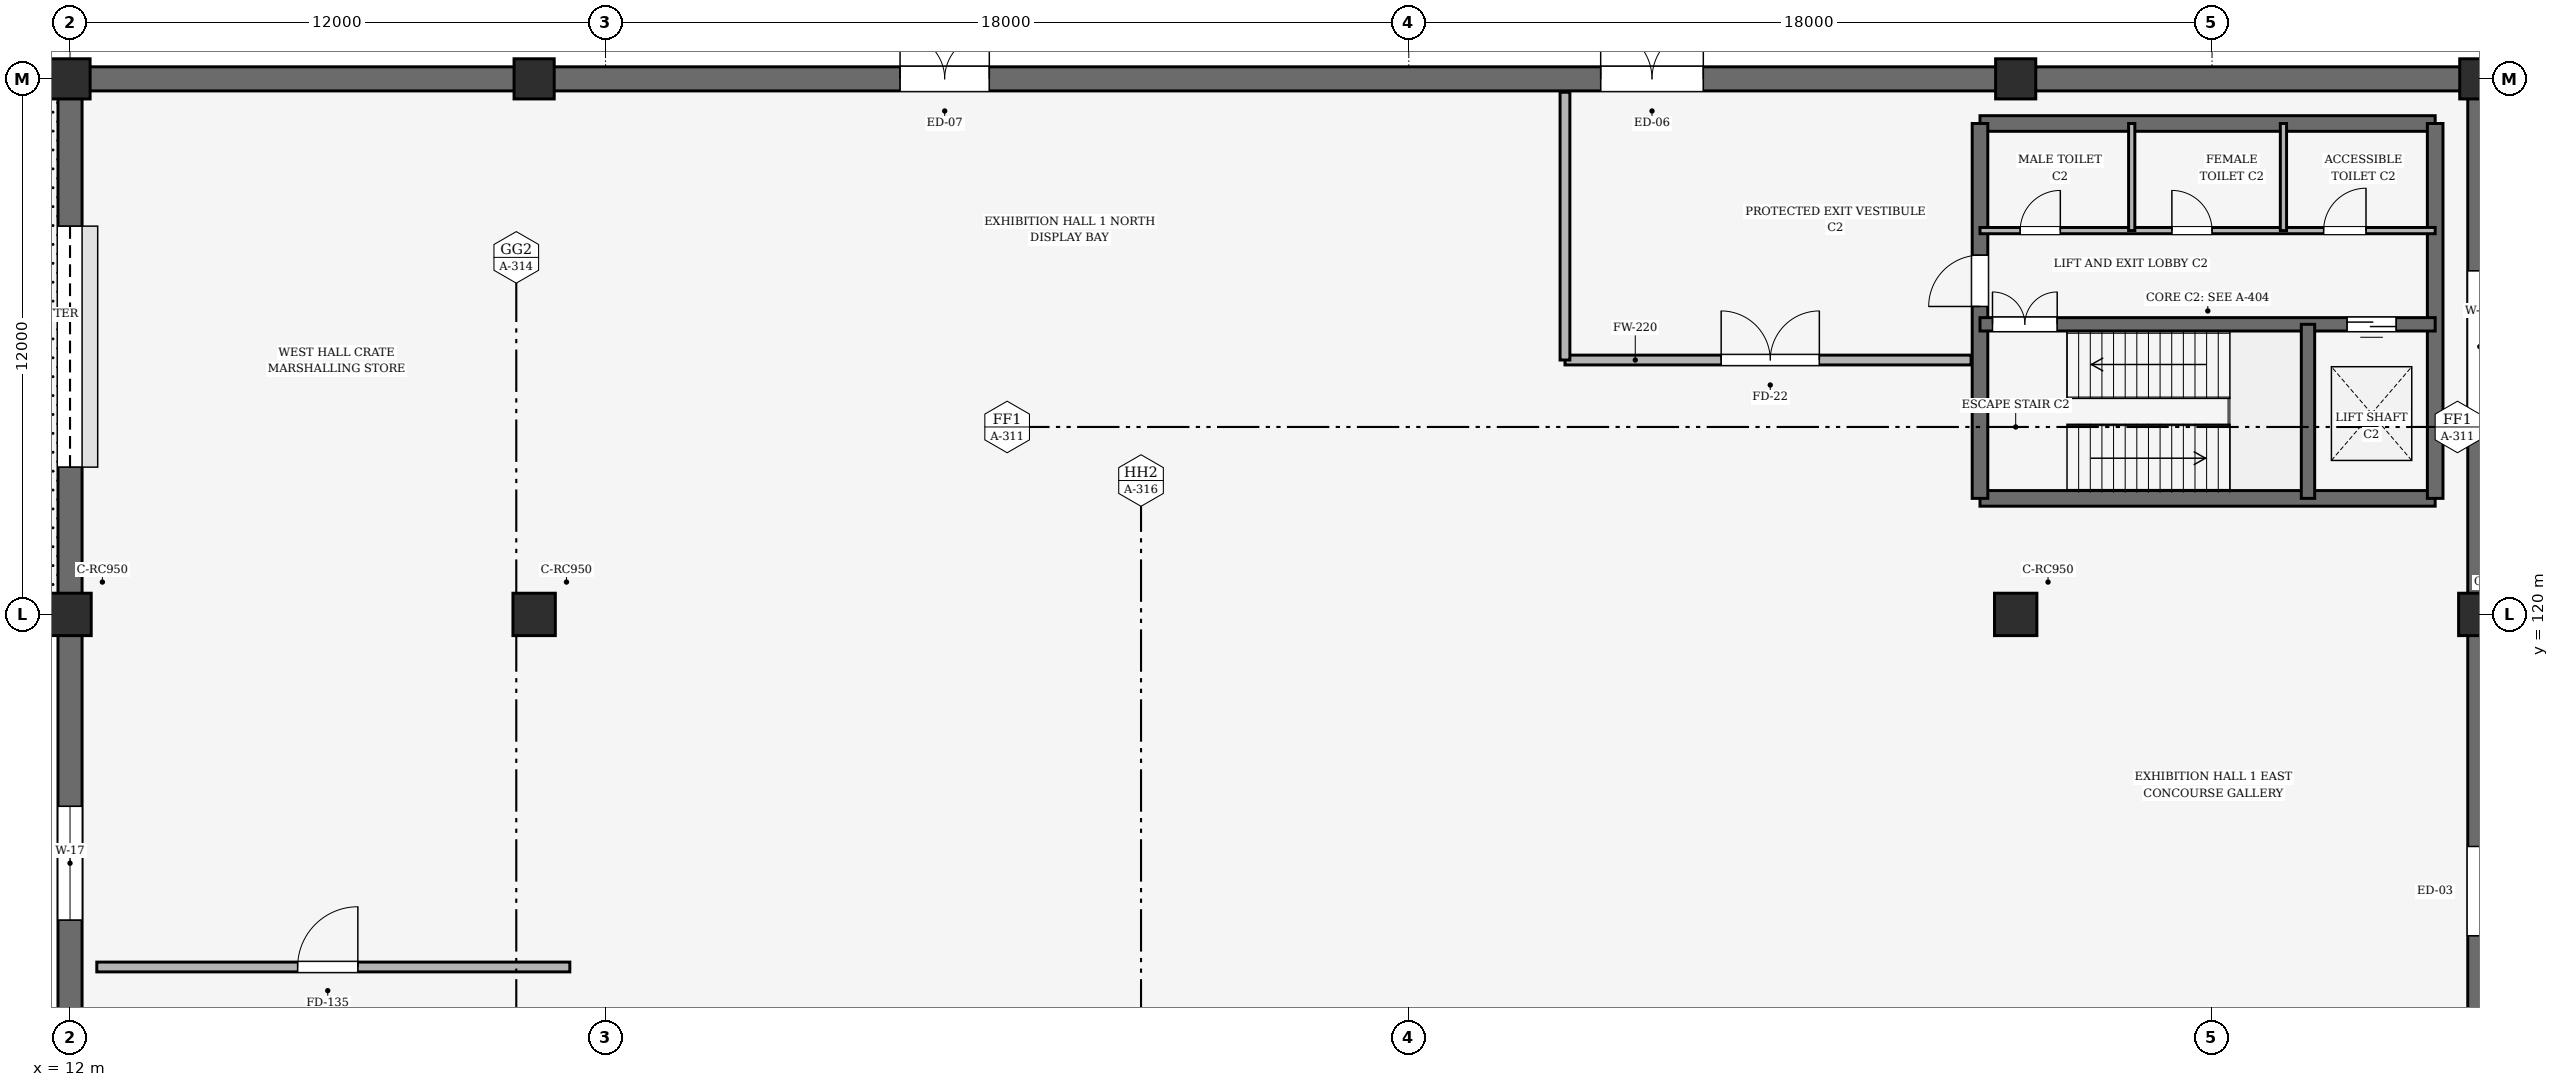
"""IFC4 building model, lengths in metres.
Left out: names, types, materials, properties, quantities, classifications, styles, units other than length and angle.
Written with IfcOpenShell. Run it as: python <this file> out.ifc"""

import sys

from ifc_helpers import new_model, si_unit, direction, frame, frame_2d, origin, origin_2d, place, context, subcontext, project, spatial, rectangle, extrude, element, fill, save


model = new_model("IFC4")
c1 = context("Model", 3, precision=1e-05, world=origin(), true_north=direction((0.0, 1.0)))
c2 = subcontext(c1, "Body", "Model", "MODEL_VIEW")
j1 = project(units=[si_unit("LENGTHUNIT", "METRE"), si_unit("PLANEANGLEUNIT", "RADIAN")], contexts=[c1])
p1 = place(None, origin())
s1 = spatial("IfcSite", under=j1, at=p1, CompositionType="ELEMENT")
p2 = place(p1, origin())
s2 = spatial("IfcBuilding", under=s1, at=p2, CompositionType="ELEMENT")
p3 = place(p2, origin())
s3 = spatial("IfcBuildingStorey", under=s2, at=p3, CompositionType="ELEMENT", Elevation=0.0)
for number, where, z_axis, x_axis in (
    (1, (12.0, 120.0, -0.44), (0.0, 0.0, 1.0), (1.0, 0.0, 0.0)),
    (2, (66.0, 120.0, -0.44), (0.0, 0.0, 1.0), (1.0, 0.0, 0.0)),
    (3, (22.4, 120.0, -0.44), (0.0, 0.0, 1.0), (1.0, 0.0, 0.0)),
    (4, (55.6, 120.0, -0.44), (0.0, 0.0, 1.0), (1.0, 0.0, 0.0)),
):
    element("IfcColumn", number, at=place(p3, frame(where, z_axis=z_axis, x_axis=x_axis)), inside=s3, PredefinedType="COLUMN", context=c2, shape_type="SweptSolid", body=[
        extrude(rectangle(XDim=0.95, YDim=0.95, at=origin_2d()), origin(), (0.0, 0.0, 1.0), 5.84),
    ])
for number, where, z_axis, x_axis in (
    (5, (12.0, 132.0, -0.44), (0.0, 0.0, 1.0), (1.0, 0.0, 0.0)),
    (6, (66.0, 132.0, -0.44), (0.0, 0.0, 1.0), (1.0, 0.0, 0.0)),
    (7, (22.4, 132.0, -0.44), (0.0, 0.0, 1.0), (1.0, 0.0, 0.0)),
    (8, (55.6, 132.0, -0.44), (0.0, 0.0, 1.0), (1.0, 0.0, 0.0)),
):
    element("IfcColumn", number, at=place(p3, frame(where, z_axis=z_axis, x_axis=x_axis)), inside=s3, PredefinedType="COLUMN", context=c2, shape_type="SweptSolid", body=[
        extrude(rectangle(XDim=0.9, YDim=0.9, at=origin_2d()), origin(), (0.0, 0.0, 1.0), 5.84),
    ])
p4 = place(p3, frame((12.0, 120.0, 0.0), z_axis=(0.0, 0.0, 1.0), x_axis=(0.0, -1.0, 0.0)))
e9 = element("IfcWall", 9, at=p4, inside=s3, PredefinedType="SOLIDWALL", context=c2, shape_type="SweptSolid", body=[
    extrude(rectangle(XDim=12.0, YDim=0.54, at=frame_2d((6.0, 0.0))), origin(), (0.0, 0.0, 1.0), 4.95),
])
p5 = place(p4, frame((4.3, 0.0, 3.1)))
e10 = element("IfcOpeningElement", 10, at=p5, cuts=e9, PredefinedType="OPENING", context=c2, shape_type="SweptSolid", body=[
    extrude(rectangle(XDim=2.55, YDim=1.3, at=frame_2d((1.275, 0.65))), frame((0.0, 0.28, 0.0), z_axis=(0.0, -1.0, 0.0), x_axis=(1.0, 0.0, 0.0)), (0.0, 0.0, 1.0), 0.56),
])
p6 = place(p3, frame((66.0, 108.0, 0.0), z_axis=(0.0, 0.0, 1.0), x_axis=(0.0, 1.0, 0.0)))
e11 = element("IfcWall", 11, at=p6, inside=s3, PredefinedType="SOLIDWALL", context=c2, shape_type="SweptSolid", body=[
    extrude(rectangle(XDim=12.0, YDim=0.54, at=frame_2d((6.0, 0.0))), origin(), (0.0, 0.0, 1.0), 4.95),
])
p7 = place(p6, frame((4.8, 0.0, 0.0)))
e12 = element("IfcOpeningElement", 12, at=p7, cuts=e11, PredefinedType="OPENING", context=c2, shape_type="SweptSolid", body=[
    extrude(rectangle(XDim=2.0, YDim=2.4, at=frame_2d((1.0, 1.2))), frame((0.0, 0.28, 0.0), z_axis=(0.0, -1.0, 0.0), x_axis=(1.0, 0.0, 0.0)), (0.0, 0.0, 1.0), 0.56),
])
p8 = place(p3, frame((12.0, 132.0, 0.0), z_axis=(0.0, 0.0, 1.0), x_axis=(0.0, -1.0, 0.0)))
e13 = element("IfcWall", 13, at=p8, inside=s3, PredefinedType="SOLIDWALL", context=c2, shape_type="SweptSolid", body=[
    extrude(rectangle(XDim=12.0, YDim=0.54, at=frame_2d((6.0, 0.0))), origin(), (0.0, 0.0, 1.0), 4.95),
])
p9 = place(p8, frame((3.3, 0.0, 0.0)))
e14 = element("IfcOpeningElement", 14, at=p9, cuts=e13, PredefinedType="OPENING", context=c2, shape_type="SweptSolid", body=[
    extrude(rectangle(XDim=5.4, YDim=4.6, at=frame_2d((2.7, 2.3))), frame((0.0, 0.28, 0.0), z_axis=(0.0, -1.0, 0.0), x_axis=(1.0, 0.0, 0.0)), (0.0, 0.0, 1.0), 0.56),
])
p10 = place(p3, frame((66.0, 120.0, 0.0), z_axis=(0.0, 0.0, 1.0), x_axis=(0.0, 1.0, 0.0)))
e15 = element("IfcWall", 15, at=p10, inside=s3, PredefinedType="SOLIDWALL", context=c2, shape_type="SweptSolid", body=[
    extrude(rectangle(XDim=12.0, YDim=0.54, at=frame_2d((6.0, 0.0))), origin(), (0.0, 0.0, 1.0), 4.95),
])
p11 = place(p10, frame((4.3, 0.0, 3.1)))
e16 = element("IfcOpeningElement", 16, at=p11, cuts=e15, PredefinedType="OPENING", context=c2, shape_type="SweptSolid", body=[
    extrude(rectangle(XDim=3.4, YDim=1.25, at=frame_2d((1.7, 0.625))), frame((0.0, 0.28, 0.0), z_axis=(0.0, -1.0, 0.0), x_axis=(1.0, 0.0, 0.0)), (0.0, 0.0, 1.0), 0.56),
])
p12 = place(p3, frame((22.4, 132.0, 0.0), z_axis=(0.0, 0.0, 1.0), x_axis=(-1.0, 0.0, 0.0)))
e17 = element("IfcWall", 17, at=p12, inside=s3, PredefinedType="SOLIDWALL", context=c2, shape_type="SweptSolid", body=[
    extrude(rectangle(XDim=10.4, YDim=0.54, at=frame_2d((5.2, 0.0))), origin(), (0.0, 0.0, 1.0), 4.95),
])
p13 = place(p3, frame((55.6, 132.0, 0.0), z_axis=(0.0, 0.0, 1.0), x_axis=(-1.0, 0.0, 0.0)))
e18 = element("IfcWall", 18, at=p13, inside=s3, PredefinedType="SOLIDWALL", context=c2, shape_type="SweptSolid", body=[
    extrude(rectangle(XDim=33.2, YDim=0.54, at=frame_2d((16.6, 0.0))), origin(), (0.0, 0.0, 1.0), 4.95),
])
p14 = place(p13, frame((7.0, 0.0, 0.0)))
e19 = element("IfcOpeningElement", 19, at=p14, cuts=e18, PredefinedType="OPENING", context=c2, shape_type="SweptSolid", body=[
    extrude(rectangle(XDim=2.3, YDim=2.55, at=frame_2d((1.15, 1.275))), frame((0.0, 0.28, 0.0), z_axis=(0.0, -1.0, 0.0), x_axis=(1.0, 0.0, 0.0)), (0.0, 0.0, 1.0), 0.56),
])
p15 = place(p13, frame((23.0, 0.0, 0.0)))
e20 = element("IfcOpeningElement", 20, at=p15, cuts=e18, PredefinedType="OPENING", context=c2, shape_type="SweptSolid", body=[
    extrude(rectangle(XDim=2.0, YDim=2.4, at=frame_2d((1.0, 1.2))), frame((0.0, 0.28, 0.0), z_axis=(0.0, -1.0, 0.0), x_axis=(1.0, 0.0, 0.0)), (0.0, 0.0, 1.0), 0.56),
])
p16 = place(p3, frame((66.0, 132.0, 0.0), z_axis=(0.0, 0.0, 1.0), x_axis=(-1.0, 0.0, 0.0)))
e21 = element("IfcWall", 21, at=p16, inside=s3, PredefinedType="SOLIDWALL", context=c2, shape_type="SweptSolid", body=[
    extrude(rectangle(XDim=10.4, YDim=0.54, at=frame_2d((5.2, 0.0))), origin(), (0.0, 0.0, 1.0), 4.95),
])
for number, where, z_axis, x_axis in (
    (22, (54.8, 122.6, 0.0), (0.0, 0.0, 1.0), (1.0, 0.0, 0.0)),
    (23, (65.0, 131.0, 0.0), (0.0, 0.0, 1.0), (-1.0, 0.0, 0.0)),
):
    element("IfcWall", number, at=place(p3, frame(where, z_axis=z_axis, x_axis=x_axis)), inside=s3, PredefinedType="SHEAR", context=c2, shape_type="SweptSolid", body=[
        extrude(rectangle(XDim=10.2, YDim=0.35, at=frame_2d((5.1, 0.0))), origin(), (0.0, 0.0, 1.0), 5.4),
    ])
p17 = place(p3, frame((54.8, 131.0, 0.0), z_axis=(0.0, 0.0, 1.0), x_axis=(0.0, -1.0, 0.0)))
e24 = element("IfcWall", 24, at=p17, inside=s3, PredefinedType="SHEAR", context=c2, shape_type="SweptSolid", body=[
    extrude(rectangle(XDim=8.4, YDim=0.35, at=frame_2d((4.2, 0.0))), origin(), (0.0, 0.0, 1.0), 5.4),
])
p18 = place(p17, frame((2.95, 0.0, 0.0)))
e25 = element("IfcOpeningElement", 25, at=p18, cuts=e24, PredefinedType="OPENING", context=c2, shape_type="SweptSolid", body=[
    extrude(rectangle(XDim=1.15, YDim=2.15, at=frame_2d((0.575, 1.075))), frame((0.0, 0.185, 0.0), z_axis=(0.0, -1.0, 0.0), x_axis=(1.0, 0.0, 0.0)), (0.0, 0.0, 1.0), 0.37),
])
p19 = place(p3, frame((65.0, 122.6, 0.0), z_axis=(0.0, 0.0, 1.0), x_axis=(0.0, 1.0, 0.0)))
e26 = element("IfcWall", 26, at=p19, inside=s3, PredefinedType="SHEAR", context=c2, shape_type="SweptSolid", body=[
    extrude(rectangle(XDim=8.4, YDim=0.35, at=frame_2d((4.2, 0.0))), origin(), (0.0, 0.0, 1.0), 5.4),
])
p20 = place(p3, frame((54.8, 126.5, 0.0), z_axis=(0.0, 0.0, 1.0), x_axis=(1.0, 0.0, 0.0)))
e27 = element("IfcWall", 27, at=p20, inside=s3, PredefinedType="SHEAR", context=c2, shape_type="SweptSolid", body=[
    extrude(rectangle(XDim=10.2, YDim=0.3, at=frame_2d((5.1, 0.0))), origin(), (0.0, 0.0, 1.0), 5.4),
])
p21 = place(p20, frame((0.28, 0.0, 0.0)))
e28 = element("IfcOpeningElement", 28, at=p21, cuts=e27, PredefinedType="OPENING", context=c2, shape_type="SweptSolid", body=[
    extrude(rectangle(XDim=1.45, YDim=2.15, at=frame_2d((0.725, 1.075))), frame((0.0, 0.16, 0.0), z_axis=(0.0, -1.0, 0.0), x_axis=(1.0, 0.0, 0.0)), (0.0, 0.0, 1.0), 0.32),
])
p22 = place(p20, frame((8.225, 0.0, 0.0)))
e29 = element("IfcOpeningElement", 29, at=p22, cuts=e27, PredefinedType="OPENING", context=c2, shape_type="SweptSolid", body=[
    extrude(rectangle(XDim=1.1, YDim=2.15, at=frame_2d((0.55, 1.075))), frame((0.0, 0.16, 0.0), z_axis=(0.0, -1.0, 0.0), x_axis=(1.0, 0.0, 0.0)), (0.0, 0.0, 1.0), 0.32),
])
p23 = place(p3, frame((62.15, 122.6, 0.0), z_axis=(0.0, 0.0, 1.0), x_axis=(0.0, 1.0, 0.0)))
e30 = element("IfcWall", 30, at=p23, inside=s3, PredefinedType="SHEAR", context=c2, shape_type="SweptSolid", body=[
    extrude(rectangle(XDim=3.9, YDim=0.3, at=frame_2d((1.95, 0.0))), origin(), (0.0, 0.0, 1.0), 5.4),
])
p24 = place(p3, frame((54.8, 128.6, 0.0), z_axis=(0.0, 0.0, 1.0), x_axis=(1.0, 0.0, 0.0)))
e31 = element("IfcWall", 31, at=p24, inside=s3, PredefinedType="PARTITIONING", context=c2, shape_type="SweptSolid", body=[
    extrude(rectangle(XDim=10.2, YDim=0.14, at=frame_2d((5.1, 0.0))), origin(), (0.0, 0.0, 1.0), 4.5),
])
p25 = place(p24, frame((0.9, 0.0, 0.0)))
e32 = element("IfcOpeningElement", 32, at=p25, cuts=e31, PredefinedType="OPENING", context=c2, shape_type="SweptSolid", body=[
    extrude(rectangle(XDim=0.9, YDim=2.1, at=frame_2d((0.45, 1.05))), frame((0.0, 0.08, 0.0), z_axis=(0.0, -1.0, 0.0), x_axis=(1.0, 0.0, 0.0)), (0.0, 0.0, 1.0), 0.16),
])
p26 = place(p24, frame((4.3, 0.0, 0.0)))
e33 = element("IfcOpeningElement", 33, at=p26, cuts=e31, PredefinedType="OPENING", context=c2, shape_type="SweptSolid", body=[
    extrude(rectangle(XDim=0.9, YDim=2.1, at=frame_2d((0.45, 1.05))), frame((0.0, 0.08, 0.0), z_axis=(0.0, -1.0, 0.0), x_axis=(1.0, 0.0, 0.0)), (0.0, 0.0, 1.0), 0.16),
])
p27 = place(p24, frame((7.7, 0.0, 0.0)))
e34 = element("IfcOpeningElement", 34, at=p27, cuts=e31, PredefinedType="OPENING", context=c2, shape_type="SweptSolid", body=[
    extrude(rectangle(XDim=0.95, YDim=2.1, at=frame_2d((0.475, 1.05))), frame((0.0, 0.08, 0.0), z_axis=(0.0, -1.0, 0.0), x_axis=(1.0, 0.0, 0.0)), (0.0, 0.0, 1.0), 0.16),
])
for number, where, z_axis, x_axis in (
    (35, (58.2, 128.6, 0.0), (0.0, 0.0, 1.0), (0.0, 1.0, 0.0)),
    (36, (61.6, 128.6, 0.0), (0.0, 0.0, 1.0), (0.0, 1.0, 0.0)),
):
    element("IfcWall", number, at=place(p3, frame(where, z_axis=z_axis, x_axis=x_axis)), inside=s3, PredefinedType="PARTITIONING", context=c2, shape_type="SweptSolid", body=[
        extrude(rectangle(XDim=2.4, YDim=0.14, at=frame_2d((1.2, 0.0))), origin(), (0.0, 0.0, 1.0), 4.5),
    ])
p28 = place(p3, frame((54.6, 125.7, 0.0), z_axis=(0.0, 0.0, 1.0), x_axis=(-1.0, 0.0, 0.0)))
e37 = element("IfcWall", 37, at=p28, inside=s3, PredefinedType="SOLIDWALL", context=c2, shape_type="SweptSolid", body=[
    extrude(rectangle(XDim=9.1, YDim=0.22, at=frame_2d((4.55, 0.0))), origin(), (0.0, 0.0, 1.0), 4.9),
])
p29 = place(p28, frame((3.4, 0.0, 0.0)))
e38 = element("IfcOpeningElement", 38, at=p29, cuts=e37, PredefinedType="OPENING", context=c2, shape_type="SweptSolid", body=[
    extrude(rectangle(XDim=2.2, YDim=2.3, at=frame_2d((1.1, 1.15))), frame((0.0, 0.12, 0.0), z_axis=(0.0, -1.0, 0.0), x_axis=(1.0, 0.0, 0.0)), (0.0, 0.0, 1.0), 0.24),
])
p30 = place(p3, frame((45.5, 125.7, 0.0), z_axis=(0.0, 0.0, 1.0), x_axis=(0.0, 1.0, 0.0)))
e39 = element("IfcWall", 39, at=p30, inside=s3, PredefinedType="SOLIDWALL", context=c2, shape_type="SweptSolid", body=[
    extrude(rectangle(XDim=6.0, YDim=0.22, at=frame_2d((3.0, 0.0))), origin(), (0.0, 0.0, 1.0), 4.9),
])
p31 = place(p3, frame((12.6, 112.1, 0.0), z_axis=(0.0, 0.0, 1.0), x_axis=(1.0, 0.0, 0.0)))
e40 = element("IfcWall", 40, at=p31, inside=s3, PredefinedType="SOLIDWALL", context=c2, shape_type="SweptSolid", body=[
    extrude(rectangle(XDim=10.6, YDim=0.22, at=frame_2d((5.3, 0.0))), origin(), (0.0, 0.0, 1.0), 4.1),
])
p32 = place(p31, frame((4.5, 0.0, 0.0)))
e41 = element("IfcOpeningElement", 41, at=p32, cuts=e40, PredefinedType="OPENING", context=c2, shape_type="SweptSolid", body=[
    extrude(rectangle(XDim=1.35, YDim=2.2, at=frame_2d((0.675, 1.1))), frame((0.0, 0.12, 0.0), z_axis=(0.0, -1.0, 0.0), x_axis=(1.0, 0.0, 0.0)), (0.0, 0.0, 1.0), 0.24),
])
p33 = place(p5, origin())
e42 = element("IfcWindow", 42, at=p33, inside=s3, PartitioningType="DOUBLE_PANEL_HORIZONTAL", PredefinedType="WINDOW", context=c2, shape_type="SweptSolid", body=[
    extrude(rectangle(XDim=2.55, YDim=1.3, at=frame_2d((1.275, 0.65))), frame((0.0, 0.03, 0.0), z_axis=(0.0, -1.0, 0.0), x_axis=(1.0, 0.0, 0.0)), (0.0, 0.0, 1.0), 0.06),
])
fill(e10, e42)
p34 = place(p7, frame((2.0, 0.0, 0.0), z_axis=(0.0, 0.0, 1.0), x_axis=(-1.0, 0.0, 0.0)))
e43 = element("IfcDoor", 43, at=p34, inside=s3, OperationType="DOUBLE_DOOR_SINGLE_SWING", PredefinedType="DOOR", context=c2, shape_type="SweptSolid", body=[
    extrude(rectangle(XDim=2.0, YDim=2.4, at=frame_2d((1.0, 1.2))), frame((0.0, 0.025, 0.0), z_axis=(0.0, -1.0, 0.0), x_axis=(1.0, 0.0, 0.0)), (0.0, 0.0, 1.0), 0.05),
])
fill(e12, e43)
p35 = place(p9, origin())
e44 = element("IfcDoor", 44, at=p35, inside=s3, OperationType="ROLLINGUP", PredefinedType="GATE", context=c2, shape_type="SweptSolid", body=[
    extrude(rectangle(XDim=5.4, YDim=4.6, at=frame_2d((2.7, 2.3))), frame((0.0, 0.025, 0.0), z_axis=(0.0, -1.0, 0.0), x_axis=(1.0, 0.0, 0.0)), (0.0, 0.0, 1.0), 0.05),
])
fill(e14, e44)
p36 = place(p11, origin())
e45 = element("IfcWindow", 45, at=p36, inside=s3, PartitioningType="TRIPLE_PANEL_HORIZONTAL", PredefinedType="WINDOW", context=c2, shape_type="SweptSolid", body=[
    extrude(rectangle(XDim=3.4, YDim=1.25, at=frame_2d((1.7, 0.625))), frame((0.0, 0.03, 0.0), z_axis=(0.0, -1.0, 0.0), x_axis=(1.0, 0.0, 0.0)), (0.0, 0.0, 1.0), 0.06),
])
fill(e16, e45)
p37 = place(p14, frame((2.3, 0.0, 0.0), z_axis=(0.0, 0.0, 1.0), x_axis=(-1.0, 0.0, 0.0)))
e46 = element("IfcDoor", 46, at=p37, inside=s3, OperationType="DOUBLE_DOOR_SINGLE_SWING", PredefinedType="DOOR", context=c2, shape_type="SweptSolid", body=[
    extrude(rectangle(XDim=2.3, YDim=2.55, at=frame_2d((1.15, 1.275))), frame((0.0, 0.025, 0.0), z_axis=(0.0, -1.0, 0.0), x_axis=(1.0, 0.0, 0.0)), (0.0, 0.0, 1.0), 0.05),
])
fill(e19, e46)
p38 = place(p15, frame((2.0, 0.0, 0.0), z_axis=(0.0, 0.0, 1.0), x_axis=(-1.0, 0.0, 0.0)))
e47 = element("IfcDoor", 47, at=p38, inside=s3, OperationType="DOUBLE_DOOR_SINGLE_SWING", PredefinedType="DOOR", context=c2, shape_type="SweptSolid", body=[
    extrude(rectangle(XDim=2.0, YDim=2.4, at=frame_2d((1.0, 1.2))), frame((0.0, 0.025, 0.0), z_axis=(0.0, -1.0, 0.0), x_axis=(1.0, 0.0, 0.0)), (0.0, 0.0, 1.0), 0.05),
])
fill(e20, e47)
p39 = place(p18, frame((1.15, 0.0, 0.0), z_axis=(0.0, 0.0, 1.0), x_axis=(-1.0, 0.0, 0.0)))
e48 = element("IfcDoor", 48, at=p39, inside=s3, OperationType="SINGLE_SWING_LEFT", PredefinedType="DOOR", context=c2, shape_type="SweptSolid", body=[
    extrude(rectangle(XDim=1.15, YDim=2.15, at=frame_2d((0.575, 1.075))), frame((0.0, 0.025, 0.0), z_axis=(0.0, -1.0, 0.0), x_axis=(1.0, 0.0, 0.0)), (0.0, 0.0, 1.0), 0.05),
])
fill(e25, e48)
p40 = place(p21, origin())
e49 = element("IfcDoor", 49, at=p40, inside=s3, OperationType="DOUBLE_DOOR_SINGLE_SWING", PredefinedType="DOOR", context=c2, shape_type="SweptSolid", body=[
    extrude(rectangle(XDim=1.45, YDim=2.15, at=frame_2d((0.725, 1.075))), frame((0.0, 0.025, 0.0), z_axis=(0.0, -1.0, 0.0), x_axis=(1.0, 0.0, 0.0)), (0.0, 0.0, 1.0), 0.05),
])
fill(e28, e49)
p41 = place(p22, origin())
e50 = element("IfcDoor", 50, at=p41, inside=s3, OperationType="DOUBLE_DOOR_SLIDING", PredefinedType="DOOR", context=c2, shape_type="SweptSolid", body=[
    extrude(rectangle(XDim=1.1, YDim=2.15, at=frame_2d((0.55, 1.075))), frame((0.0, 0.025, 0.0), z_axis=(0.0, -1.0, 0.0), x_axis=(1.0, 0.0, 0.0)), (0.0, 0.0, 1.0), 0.05),
])
fill(e29, e50)
p42 = place(p25, origin())
e51 = element("IfcDoor", 51, at=p42, inside=s3, OperationType="SINGLE_SWING_RIGHT", PredefinedType="DOOR", context=c2, shape_type="SweptSolid", body=[
    extrude(rectangle(XDim=0.9, YDim=2.1, at=frame_2d((0.45, 1.05))), frame((0.0, 0.025, 0.0), z_axis=(0.0, -1.0, 0.0), x_axis=(1.0, 0.0, 0.0)), (0.0, 0.0, 1.0), 0.05),
])
fill(e32, e51)
p43 = place(p26, origin())
e52 = element("IfcDoor", 52, at=p43, inside=s3, OperationType="SINGLE_SWING_LEFT", PredefinedType="DOOR", context=c2, shape_type="SweptSolid", body=[
    extrude(rectangle(XDim=0.9, YDim=2.1, at=frame_2d((0.45, 1.05))), frame((0.0, 0.025, 0.0), z_axis=(0.0, -1.0, 0.0), x_axis=(1.0, 0.0, 0.0)), (0.0, 0.0, 1.0), 0.05),
])
fill(e33, e52)
p44 = place(p27, origin())
e53 = element("IfcDoor", 53, at=p44, inside=s3, OperationType="SINGLE_SWING_RIGHT", PredefinedType="DOOR", context=c2, shape_type="SweptSolid", body=[
    extrude(rectangle(XDim=0.95, YDim=2.1, at=frame_2d((0.475, 1.05))), frame((0.0, 0.025, 0.0), z_axis=(0.0, -1.0, 0.0), x_axis=(1.0, 0.0, 0.0)), (0.0, 0.0, 1.0), 0.05),
])
fill(e34, e53)
p45 = place(p29, frame((2.2, 0.0, 0.0), z_axis=(0.0, 0.0, 1.0), x_axis=(-1.0, 0.0, 0.0)))
e54 = element("IfcDoor", 54, at=p45, inside=s3, OperationType="DOUBLE_DOOR_SINGLE_SWING", PredefinedType="DOOR", context=c2, shape_type="SweptSolid", body=[
    extrude(rectangle(XDim=2.2, YDim=2.3, at=frame_2d((1.1, 1.15))), frame((0.0, 0.025, 0.0), z_axis=(0.0, -1.0, 0.0), x_axis=(1.0, 0.0, 0.0)), (0.0, 0.0, 1.0), 0.05),
])
fill(e38, e54)
p46 = place(p32, origin())
e55 = element("IfcDoor", 55, at=p46, inside=s3, OperationType="SINGLE_SWING_RIGHT", PredefinedType="DOOR", context=c2, shape_type="SweptSolid", body=[
    extrude(rectangle(XDim=1.35, YDim=2.2, at=frame_2d((0.675, 1.1))), frame((0.0, 0.025, 0.0), z_axis=(0.0, -1.0, 0.0), x_axis=(1.0, 0.0, 0.0)), (0.0, 0.0, 1.0), 0.05),
])
fill(e41, e55)
save(model, sys.argv[1])
